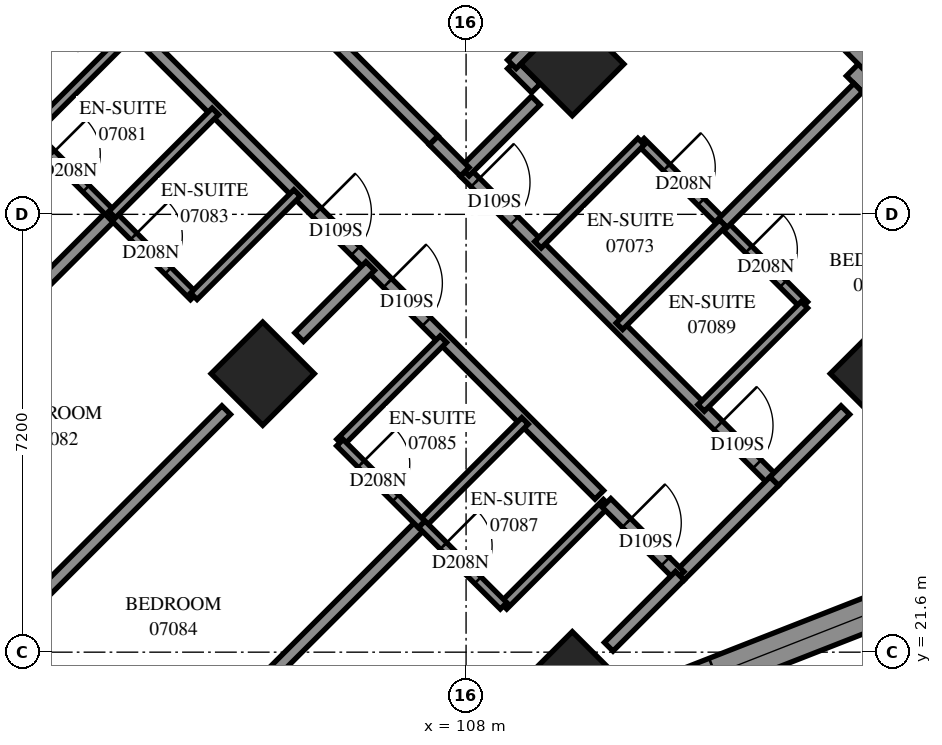
"""IFC4 building model, lengths in metres.
Left out: names, types, materials, properties, quantities, classifications, styles, units other than length and angle.
Written with IfcOpenShell. Run it as: python <this file> out.ifc"""

import sys

from ifc_helpers import new_model, si_unit, direction, frame, frame_2d, origin, origin_2d, place, context, subcontext, project, spatial, polyline, rectangle, outline, extrude, element, fill, save


model = new_model("IFC4")
c1 = context("Model", 3, precision=1e-05, world=origin(), true_north=direction((0.0, 1.0)))
c2 = subcontext(c1, "Body", "Model", "MODEL_VIEW")
j1 = project(units=[si_unit("LENGTHUNIT", "METRE"), si_unit("PLANEANGLEUNIT", "RADIAN")], contexts=[c1])
p1 = place(None, origin())
s1 = spatial("IfcSite", under=j1, at=p1, CompositionType="ELEMENT")
p2 = place(p1, origin())
s2 = spatial("IfcBuilding", under=s1, at=p2, CompositionType="ELEMENT")
p3 = place(p2, frame((0.0, 0.0, 30.4)))
s3 = spatial("IfcBuildingStorey", under=s2, at=p3, CompositionType="ELEMENT", Elevation=30.4)
for number, where, z_axis, x_axis in (
    (1, (109.747, 31.271, 0.0), (0.0, 0.0, 1.0), (0.707, -0.707, 0.0)),
    (2, (104.656, 26.18, 0.0), (0.0, 0.0, 1.0), (0.707, -0.707, 0.0)),
    (3, (114.838, 26.18, 0.0), (0.0, 0.0, 1.0), (0.707, -0.707, 0.0)),
    (4, (109.747, 21.088, 0.0), (0.0, 0.0, 1.0), (0.707, -0.707, 0.0)),
):
    element("IfcColumn", number, at=place(p3, frame(where, z_axis=z_axis, x_axis=x_axis)), inside=s3, PredefinedType="COLUMN", context=c2, shape_type="SweptSolid", body=[
        extrude(rectangle(XDim=1.2, YDim=1.2, at=origin_2d()), origin(), (0.0, 0.0, 1.0), 3.1),
    ])
p4 = place(p3, frame((111.044, 20.83, 0.0), z_axis=(0.0, 0.0, 1.0), x_axis=(0.9311384103, 0.3646659578, 0.0)))
e5 = element("IfcWall", 5, at=p4, inside=s3, PredefinedType="SOLIDWALL", context=c2, shape_type="SweptSolid", body=[
    extrude(outline(polyline([(0.12, -0.275), (5.613, -0.275), (5.361, 0.275), (-0.12, 0.275), (0.12, -0.275)])), origin(), (0.0, 0.0, 1.0), 3.1),
])
p5 = place(p4, frame((1.13, 0.0, 0.5)))
e6 = element("IfcOpeningElement", 6, at=p5, cuts=e5, PredefinedType="OPENING", context=c2, shape_type="SweptSolid", body=[
    extrude(rectangle(XDim=2.8, YDim=2.45, at=frame_2d((1.4, 1.225))), frame((0.0, 0.285, 0.0), z_axis=(0.0, -1.0, 0.0), x_axis=(1.0, 0.0, 0.0)), (0.0, 0.0, 1.0), 0.57),
])
p6 = place(p3, frame((117.915, 27.805, 0.0), z_axis=(0.0, 0.0, 1.0), x_axis=(-0.7070965801, 0.7071169822, 0.0)))
e7 = element("IfcWall", 7, at=p6, inside=s3, PredefinedType="SOLIDWALL", context=c2, shape_type="SweptSolid", body=[
    extrude(outline(polyline([(-0.173, -0.275), (4.627, -0.275), (5.176, 0.275), (0.173, 0.275), (-0.173, -0.275)])), origin(), (0.0, 0.0, 1.0), 3.1),
])
p7 = place(p6, frame((1.964, 0.0, 0.6)))
e8 = element("IfcOpeningElement", 8, at=p7, cuts=e7, PredefinedType="OPENING", context=c2, shape_type="SweptSolid", body=[
    extrude(rectangle(XDim=1.8, YDim=1.9, at=frame_2d((0.9, 0.95))), frame((0.0, 0.285, 0.0), z_axis=(0.0, -1.0, 0.0), x_axis=(1.0, 0.0, 0.0)), (0.0, 0.0, 1.0), 0.57),
])
p8 = place(p3, frame((114.449, 31.271, 0.0), z_axis=(0.0, 0.0, 1.0), x_axis=(0.7070979247, 0.7071156376, 0.0)))
e9 = element("IfcWall", 9, at=p8, inside=s3, PredefinedType="SOLIDWALL", context=c2, shape_type="SweptSolid", body=[
    extrude(outline(polyline([(0.275, -0.275), (6.005, -0.275), (5.286, 0.275), (-0.275, 0.275), (0.275, -0.275)])), origin(), (0.0, 0.0, 1.0), 3.1),
])
p9 = place(p8, frame((1.137, 0.0, 0.6)))
e10 = element("IfcOpeningElement", 10, at=p9, cuts=e9, PredefinedType="OPENING", context=c2, shape_type="SweptSolid", body=[
    extrude(rectangle(XDim=1.8, YDim=1.9, at=frame_2d((0.9, 0.95))), frame((0.0, 0.285, 0.0), z_axis=(0.0, -1.0, 0.0), x_axis=(1.0, 0.0, 0.0)), (0.0, 0.0, 1.0), 0.57),
])
p10 = place(p3, frame((102.609, 31.769, 0.0), z_axis=(0.0, 0.0, 1.0), x_axis=(0.7071067812, -0.7071067812, 0.0)))
e11 = element("IfcWall", 11, at=p10, inside=s3, PredefinedType="PARTITIONING", context=c2, shape_type="SweptSolid", body=[
    extrude(rectangle(XDim=10.723, YDim=0.2, at=frame_2d((5.361, 0.0))), origin(), (0.0, 0.0, 1.0), 3.1),
])
p11 = place(p10, frame((4.15, 0.0, 0.0)))
e12 = element("IfcOpeningElement", 12, at=p11, cuts=e11, PredefinedType="OPENING", context=c2, shape_type="SweptSolid", body=[
    extrude(rectangle(XDim=0.9, YDim=2.1, at=frame_2d((0.45, 1.05))), frame((0.0, 0.11, 0.0), z_axis=(0.0, -1.0, 0.0), x_axis=(1.0, 0.0, 0.0)), (0.0, 0.0, 1.0), 0.22),
])
p12 = place(p10, frame((5.8, 0.0, 0.0)))
e13 = element("IfcOpeningElement", 13, at=p12, cuts=e11, PredefinedType="OPENING", context=c2, shape_type="SweptSolid", body=[
    extrude(rectangle(XDim=0.9, YDim=2.1, at=frame_2d((0.45, 1.05))), frame((0.0, 0.11, 0.0), z_axis=(0.0, -1.0, 0.0), x_axis=(1.0, 0.0, 0.0)), (0.0, 0.0, 1.0), 0.22),
])
p13 = place(p3, frame((101.592, 18.033, 0.0), z_axis=(0.0, 0.0, 1.0), x_axis=(0.7072375867, 0.7069759514, 0.0)))
e14 = element("IfcWall", 14, at=p13, inside=s3, PredefinedType="PARTITIONING", context=c2, shape_type="SweptSolid", body=[
    extrude(rectangle(XDim=8.026, YDim=0.2, at=frame_2d((4.013, 0.0))), origin(), (0.0, 0.0, 1.0), 3.1),
])
p14 = place(p3, frame((96.538, 23.155, 0.0), z_axis=(0.0, 0.0, 1.0), x_axis=(0.7071130469, 0.7071005154, 0.0)))
e15 = element("IfcWall", 15, at=p14, inside=s3, PredefinedType="PARTITIONING", context=c2, shape_type="SweptSolid", body=[
    extrude(rectangle(XDim=7.98, YDim=0.2, at=frame_2d((3.99, 0.0))), origin(), (0.0, 0.0, 1.0), 3.1),
])
p15 = place(p3, frame((107.977, 29.499, 0.0), z_axis=(0.0, 0.0, 1.0), x_axis=(0.7071067812, -0.7071067812, 0.0)))
e16 = element("IfcWall", 16, at=p15, inside=s3, PredefinedType="PARTITIONING", context=c2, shape_type="SweptSolid", body=[
    extrude(rectangle(XDim=7.198, YDim=0.2, at=frame_2d((3.599, 0.0))), origin(), (0.0, 0.0, 1.0), 3.1),
])
p16 = place(p15, frame((0.247, 0.0, 0.0)))
e17 = element("IfcOpeningElement", 17, at=p16, cuts=e16, PredefinedType="OPENING", context=c2, shape_type="SweptSolid", body=[
    extrude(rectangle(XDim=0.9, YDim=2.1, at=frame_2d((0.45, 1.05))), frame((0.0, 0.11, 0.0), z_axis=(0.0, -1.0, 0.0), x_axis=(1.0, 0.0, 0.0)), (0.0, 0.0, 1.0), 0.22),
])
p17 = place(p15, frame((5.899, 0.0, 0.0)))
e18 = element("IfcOpeningElement", 18, at=p17, cuts=e16, PredefinedType="OPENING", context=c2, shape_type="SweptSolid", body=[
    extrude(rectangle(XDim=0.9, YDim=2.1, at=frame_2d((0.45, 1.05))), frame((0.0, 0.11, 0.0), z_axis=(0.0, -1.0, 0.0), x_axis=(1.0, 0.0, 0.0)), (0.0, 0.0, 1.0), 0.22),
])
p18 = place(p3, frame((100.163, 21.689, 0.0), z_axis=(0.0, 0.0, 1.0), x_axis=(0.7071067812, 0.7071067812, 0.0)))
e19 = element("IfcWall", 19, at=p18, inside=s3, PredefinedType="PARTITIONING", context=c2, shape_type="SweptSolid", body=[
    extrude(rectangle(XDim=5.504, YDim=0.2, at=frame_2d((2.752, 0.0))), origin(), (0.0, 0.0, 1.0), 3.1),
])
p19 = place(p3, frame((110.875, 29.995, 0.0), z_axis=(0.0, 0.0, 1.0), x_axis=(0.7071067812, -0.7071067812, 0.0)))
e20 = element("IfcWall", 20, at=p19, inside=s3, PredefinedType="PARTITIONING", context=c2, shape_type="SweptSolid", body=[
    extrude(rectangle(XDim=3.801, YDim=0.15, at=frame_2d((1.901, 0.0))), origin(), (0.0, 0.0, 1.0), 3.1),
])
p20 = place(p19, frame((0.598, 0.0, 0.0)))
e21 = element("IfcOpeningElement", 21, at=p20, cuts=e20, PredefinedType="OPENING", context=c2, shape_type="SweptSolid", body=[
    extrude(rectangle(XDim=0.8, YDim=2.1, at=frame_2d((0.4, 1.05))), frame((0.0, 0.085, 0.0), z_axis=(0.0, -1.0, 0.0), x_axis=(1.0, 0.0, 0.0)), (0.0, 0.0, 1.0), 0.17),
])
p21 = place(p19, frame((2.507, 0.0, 0.0)))
e22 = element("IfcOpeningElement", 22, at=p21, cuts=e20, PredefinedType="OPENING", context=c2, shape_type="SweptSolid", body=[
    extrude(rectangle(XDim=0.8, YDim=2.1, at=frame_2d((0.4, 1.05))), frame((0.0, 0.085, 0.0), z_axis=(0.0, -1.0, 0.0), x_axis=(1.0, 0.0, 0.0)), (0.0, 0.0, 1.0), 0.17),
])
p22 = place(p3, frame((100.836, 30.138, 0.0), z_axis=(0.0, 0.0, 1.0), x_axis=(0.7065802685, -0.7076329021, 0.0)))
e23 = element("IfcWall", 23, at=p22, inside=s3, PredefinedType="PARTITIONING", context=c2, shape_type="SweptSolid", body=[
    extrude(rectangle(XDim=3.8, YDim=0.15, at=frame_2d((1.9, 0.0))), origin(), (0.0, 0.0, 1.0), 3.1),
])
p23 = place(p22, frame((0.493, 0.0, 0.0)))
e24 = element("IfcOpeningElement", 24, at=p23, cuts=e23, PredefinedType="OPENING", context=c2, shape_type="SweptSolid", body=[
    extrude(rectangle(XDim=0.8, YDim=2.1, at=frame_2d((0.4, 1.05))), frame((0.0, 0.085, 0.0), z_axis=(0.0, -1.0, 0.0), x_axis=(1.0, 0.0, 0.0)), (0.0, 0.0, 1.0), 0.17),
])
p24 = place(p22, frame((2.402, 0.0, 0.0)))
e25 = element("IfcOpeningElement", 25, at=p24, cuts=e23, PredefinedType="OPENING", context=c2, shape_type="SweptSolid", body=[
    extrude(rectangle(XDim=0.8, YDim=2.1, at=frame_2d((0.4, 1.05))), frame((0.0, 0.085, 0.0), z_axis=(0.0, -1.0, 0.0), x_axis=(1.0, 0.0, 0.0)), (0.0, 0.0, 1.0), 0.17),
])
p25 = place(p3, frame((112.221, 28.655, 0.0), z_axis=(0.0, 0.0, 1.0), x_axis=(0.7071067812, 0.7071067812, 0.0)))
e26 = element("IfcWall", 26, at=p25, inside=s3, PredefinedType="PARTITIONING", context=c2, shape_type="SweptSolid", body=[
    extrude(rectangle(XDim=3.15, YDim=0.2, at=frame_2d((1.575, 0.0))), origin(), (0.0, 0.0, 1.0), 3.1),
])
p26 = place(p3, frame((105.435, 32.049, 0.0), z_axis=(0.0, 0.0, 1.0), x_axis=(0.7074545101, -0.7067588812, 0.0)))
e27 = element("IfcWall", 27, at=p26, inside=s3, PredefinedType="PARTITIONING", context=c2, shape_type="SweptSolid", body=[
    extrude(rectangle(XDim=2.875, YDim=0.2, at=frame_2d((1.438, 0.0))), origin(), (0.0, 0.0, 1.0), 3.1),
])
for number, where, z_axis, x_axis in (
    (28, (103.523, 27.453, 0.0), (0.0, 0.0, 1.0), (0.707, 0.707, 0.0)),
    (29, (105.927, 25.049, 0.0), (0.0, 0.0, 1.0), (0.707, 0.707, 0.0)),
    (30, (107.271, 23.705, 0.0), (0.0, 0.0, 1.0), (0.707, 0.707, 0.0)),
):
    element("IfcWall", number, at=place(p3, frame(where, z_axis=z_axis, x_axis=x_axis)), inside=s3, PredefinedType="PARTITIONING", context=c2, shape_type="SweptSolid", body=[
        extrude(rectangle(XDim=2.401, YDim=0.15, at=frame_2d((1.201, 0.0))), origin(), (0.0, 0.0, 1.0), 3.1),
    ])
for number, where, z_axis, x_axis in (
    (31, (109.182, 28.3, 0.0), (0.0, 0.0, 1.0), (0.707, 0.708, 0.0)),
    (32, (111.865, 25.616, 0.0), (0.0, 0.0, 1.0), (0.708, 0.707, 0.0)),
    (33, (110.522, 26.96, 0.0), (0.0, 0.0, 1.0), (0.708, 0.707, 0.0)),
):
    element("IfcWall", number, at=place(p3, frame(where, z_axis=z_axis, x_axis=x_axis)), inside=s3, PredefinedType="PARTITIONING", context=c2, shape_type="SweptSolid", body=[
        extrude(rectangle(XDim=2.4, YDim=0.15, at=frame_2d((1.2, 0.0))), origin(), (0.0, 0.0, 1.0), 3.1),
    ])
for number, where, z_axis, x_axis in (
    (34, (100.837, 30.141, 0.0), (0.0, 0.0, 1.0), (0.707, 0.707, 0.0)),
    (35, (108.615, 22.363, 0.0), (0.0, 0.0, 1.0), (0.707, 0.707, 0.0)),
    (36, (102.181, 28.797, 0.0), (0.0, 0.0, 1.0), (0.707, 0.707, 0.0)),
):
    element("IfcWall", number, at=place(p3, frame(where, z_axis=z_axis, x_axis=x_axis)), inside=s3, PredefinedType="PARTITIONING", context=c2, shape_type="SweptSolid", body=[
        extrude(rectangle(XDim=2.398, YDim=0.15, at=frame_2d((1.199, 0.0))), origin(), (0.0, 0.0, 1.0), 3.1),
    ])
p27 = place(p3, frame((111.513, 22.857, 0.0), z_axis=(0.0, 0.0, 1.0), x_axis=(0.7071067812, 0.7071067812, 0.0)))
e37 = element("IfcWall", 37, at=p27, inside=s3, PredefinedType="PARTITIONING", context=c2, shape_type="SweptSolid", body=[
    extrude(rectangle(XDim=2.2, YDim=0.2, at=frame_2d((1.1, 0.0))), origin(), (0.0, 0.0, 1.0), 2.6),
])
p28 = place(p3, frame((105.925, 25.045, 0.0), z_axis=(0.0, 0.0, 1.0), x_axis=(0.7071067812, -0.7071067812, 0.0)))
e38 = element("IfcWall", 38, at=p28, inside=s3, PredefinedType="PARTITIONING", context=c2, shape_type="SweptSolid", body=[
    extrude(rectangle(XDim=1.901, YDim=0.15, at=frame_2d((0.95, 0.0))), origin(), (0.0, 0.0, 1.0), 3.1),
])
p29 = place(p28, frame((0.493, 0.0, 0.0)))
e39 = element("IfcOpeningElement", 39, at=p29, cuts=e38, PredefinedType="OPENING", context=c2, shape_type="SweptSolid", body=[
    extrude(rectangle(XDim=0.8, YDim=2.1, at=frame_2d((0.4, 1.05))), frame((0.0, 0.085, 0.0), z_axis=(0.0, -1.0, 0.0), x_axis=(1.0, 0.0, 0.0)), (0.0, 0.0, 1.0), 0.17),
])
p30 = place(p3, frame((107.272, 23.704, 0.0), z_axis=(0.0, 0.0, 1.0), x_axis=(0.7076330979, -0.7065800724, 0.0)))
e40 = element("IfcWall", 40, at=p30, inside=s3, PredefinedType="PARTITIONING", context=c2, shape_type="SweptSolid", body=[
    extrude(rectangle(XDim=1.899, YDim=0.15, at=frame_2d((0.95, 0.0))), origin(), (0.0, 0.0, 1.0), 3.1),
])
p31 = place(p30, frame((0.503, 0.0, 0.0)))
e41 = element("IfcOpeningElement", 41, at=p31, cuts=e40, PredefinedType="OPENING", context=c2, shape_type="SweptSolid", body=[
    extrude(rectangle(XDim=0.8, YDim=2.1, at=frame_2d((0.4, 1.05))), frame((0.0, 0.085, 0.0), z_axis=(0.0, -1.0, 0.0), x_axis=(1.0, 0.0, 0.0)), (0.0, 0.0, 1.0), 0.17),
])
p32 = place(p3, frame((110.309, 24.055, 0.0), z_axis=(0.0, 0.0, 1.0), x_axis=(0.7071067812, -0.7071067812, 0.0)))
e42 = element("IfcWall", 42, at=p32, inside=s3, PredefinedType="PARTITIONING", context=c2, shape_type="SweptSolid", body=[
    extrude(rectangle(XDim=1.7, YDim=0.2, at=frame_2d((0.85, 0.0))), origin(), (0.0, 0.0, 1.0), 3.1),
])
p33 = place(p32, frame((0.467, 0.0, 0.0)))
e43 = element("IfcOpeningElement", 43, at=p33, cuts=e42, PredefinedType="OPENING", context=c2, shape_type="SweptSolid", body=[
    extrude(rectangle(XDim=0.9, YDim=2.1, at=frame_2d((0.45, 1.05))), frame((0.0, 0.11, 0.0), z_axis=(0.0, -1.0, 0.0), x_axis=(1.0, 0.0, 0.0)), (0.0, 0.0, 1.0), 0.22),
])
p34 = place(p3, frame((105.255, 26.781, 0.0), z_axis=(0.0, 0.0, 1.0), x_axis=(0.7071067812, 0.7071067812, 0.0)))
e44 = element("IfcWall", 44, at=p34, inside=s3, PredefinedType="PARTITIONING", context=c2, shape_type="SweptSolid", body=[
    extrude(rectangle(XDim=1.652, YDim=0.2, at=frame_2d((0.826, 0.0))), origin(), (0.0, 0.0, 1.0), 3.1),
])
for number, where, z_axis, x_axis in (
    (45, (110.346, 21.689, 0.0), (0.0, 0.0, 1.0), (0.707, 0.707, 0.0)),
    (46, (113.07, 24.413, 0.0), (0.0, 0.0, 1.0), (0.707, 0.707, 0.0)),
):
    element("IfcWall", number, at=place(p3, frame(where, z_axis=z_axis, x_axis=x_axis)), inside=s3, PredefinedType="PARTITIONING", context=c2, shape_type="SweptSolid", body=[
        extrude(rectangle(XDim=1.652, YDim=0.2, at=frame_2d((0.826, 0.0))), origin(), (0.0, 0.0, 1.0), 2.6),
    ])
p35 = place(p3, frame((107.978, 29.504, 0.0), z_axis=(0.0, 0.0, 1.0), x_axis=(0.7071067812, 0.7071067812, 0.0)))
e47 = element("IfcWall", 47, at=p35, inside=s3, PredefinedType="PARTITIONING", context=c2, shape_type="SweptSolid", body=[
    extrude(rectangle(XDim=1.652, YDim=0.2, at=frame_2d((0.826, 0.0))), origin(), (0.0, 0.0, 1.0), 3.1),
])
p36 = place(p3, frame((107.466, 30.014, 0.0), z_axis=(0.0, 0.0, 1.0), x_axis=(0.7057270646, -0.7084838109, 0.0)))
e48 = element("IfcWall", 48, at=p36, inside=s3, PredefinedType="PARTITIONING", context=c2, shape_type="SweptSolid", body=[
    extrude(rectangle(XDim=0.726, YDim=0.2, at=frame_2d((0.363, 0.0))), origin(), (0.0, 0.0, 1.0), 3.1),
])
for number, where, z_axis, x_axis in (
    (49, (108.754, 31.268, 0.0), (0.0, 0.0, 1.0), (0.707, -0.707, 0.0)),
    (50, (108.753, 31.269, 0.0), (0.0, 0.0, 1.0), (0.707, 0.707, 0.0)),
):
    element("IfcWall", number, at=place(p3, frame(where, z_axis=z_axis, x_axis=x_axis)), inside=s3, PredefinedType="PARTITIONING", context=c2, shape_type="SweptSolid", body=[
        extrude(rectangle(XDim=0.557, YDim=0.2, at=frame_2d((0.279, 0.0))), origin(), (0.0, 0.0, 1.0), 3.1),
    ])
p37 = place(p5, origin())
e51 = element("IfcWindow", 51, at=p37, inside=s3, PartitioningType="SINGLE_PANEL", PredefinedType="WINDOW", context=c2, shape_type="SweptSolid", body=[
    extrude(rectangle(XDim=2.8, YDim=2.45, at=frame_2d((1.4, 1.225))), frame((0.0, 0.155, 0.0), z_axis=(0.0, -1.0, 0.0), x_axis=(1.0, 0.0, 0.0)), (0.0, 0.0, 1.0), 0.06),
])
fill(e6, e51)
p38 = place(p16, origin())
e52 = element("IfcDoor", 52, at=p38, inside=s3, OperationType="SINGLE_SWING_LEFT", PredefinedType="DOOR", context=c2, shape_type="SweptSolid", body=[
    extrude(rectangle(XDim=0.9, YDim=2.1, at=frame_2d((0.45, 1.05))), frame((0.0, 0.025, 0.0), z_axis=(0.0, -1.0, 0.0), x_axis=(1.0, 0.0, 0.0)), (0.0, 0.0, 1.0), 0.05),
])
fill(e17, e52)
p39 = place(p20, origin())
e53 = element("IfcDoor", 53, at=p39, inside=s3, OperationType="SINGLE_SWING_RIGHT", PredefinedType="DOOR", context=c2, shape_type="SweptSolid", body=[
    extrude(rectangle(XDim=0.8, YDim=2.1, at=frame_2d((0.4, 1.05))), frame((0.0, 0.025, 0.0), z_axis=(0.0, -1.0, 0.0), x_axis=(1.0, 0.0, 0.0)), (0.0, 0.0, 1.0), 0.05),
])
fill(e21, e53)
p40 = place(p23, origin())
e54 = element("IfcDoor", 54, at=p40, inside=s3, OperationType="SINGLE_SWING_RIGHT", PredefinedType="DOOR", context=c2, shape_type="SweptSolid", body=[
    extrude(rectangle(XDim=0.8, YDim=2.1, at=frame_2d((0.4, 1.05))), frame((0.0, 0.025, 0.0), z_axis=(0.0, -1.0, 0.0), x_axis=(1.0, 0.0, 0.0)), (0.0, 0.0, 1.0), 0.05),
])
fill(e24, e54)
p41 = place(p11, origin())
e55 = element("IfcDoor", 55, at=p41, inside=s3, OperationType="SINGLE_SWING_LEFT", PredefinedType="DOOR", context=c2, shape_type="SweptSolid", body=[
    extrude(rectangle(XDim=0.9, YDim=2.1, at=frame_2d((0.45, 1.05))), frame((0.0, 0.025, 0.0), z_axis=(0.0, -1.0, 0.0), x_axis=(1.0, 0.0, 0.0)), (0.0, 0.0, 1.0), 0.05),
])
fill(e12, e55)
p42 = place(p24, origin())
e56 = element("IfcDoor", 56, at=p42, inside=s3, OperationType="SINGLE_SWING_RIGHT", PredefinedType="DOOR", context=c2, shape_type="SweptSolid", body=[
    extrude(rectangle(XDim=0.8, YDim=2.1, at=frame_2d((0.4, 1.05))), frame((0.0, 0.025, 0.0), z_axis=(0.0, -1.0, 0.0), x_axis=(1.0, 0.0, 0.0)), (0.0, 0.0, 1.0), 0.05),
])
fill(e25, e56)
p43 = place(p12, origin())
e57 = element("IfcDoor", 57, at=p43, inside=s3, OperationType="SINGLE_SWING_RIGHT", PredefinedType="DOOR", context=c2, shape_type="SweptSolid", body=[
    extrude(rectangle(XDim=0.9, YDim=2.1, at=frame_2d((0.45, 1.05))), frame((0.0, 0.025, 0.0), z_axis=(0.0, -1.0, 0.0), x_axis=(1.0, 0.0, 0.0)), (0.0, 0.0, 1.0), 0.05),
])
fill(e13, e57)
p44 = place(p29, origin())
e58 = element("IfcDoor", 58, at=p44, inside=s3, OperationType="SINGLE_SWING_RIGHT", PredefinedType="DOOR", context=c2, shape_type="SweptSolid", body=[
    extrude(rectangle(XDim=0.8, YDim=2.1, at=frame_2d((0.4, 1.05))), frame((0.0, 0.025, 0.0), z_axis=(0.0, -1.0, 0.0), x_axis=(1.0, 0.0, 0.0)), (0.0, 0.0, 1.0), 0.05),
])
fill(e39, e58)
p45 = place(p33, origin())
e59 = element("IfcDoor", 59, at=p45, inside=s3, OperationType="SINGLE_SWING_LEFT", PredefinedType="DOOR", context=c2, shape_type="SweptSolid", body=[
    extrude(rectangle(XDim=0.9, YDim=2.1, at=frame_2d((0.45, 1.05))), frame((0.0, 0.025, 0.0), z_axis=(0.0, -1.0, 0.0), x_axis=(1.0, 0.0, 0.0)), (0.0, 0.0, 1.0), 0.05),
])
fill(e43, e59)
p46 = place(p31, origin())
e60 = element("IfcDoor", 60, at=p46, inside=s3, OperationType="SINGLE_SWING_RIGHT", PredefinedType="DOOR", context=c2, shape_type="SweptSolid", body=[
    extrude(rectangle(XDim=0.8, YDim=2.1, at=frame_2d((0.4, 1.05))), frame((0.0, 0.025, 0.0), z_axis=(0.0, -1.0, 0.0), x_axis=(1.0, 0.0, 0.0)), (0.0, 0.0, 1.0), 0.05),
])
fill(e41, e60)
p47 = place(p17, origin())
e61 = element("IfcDoor", 61, at=p47, inside=s3, OperationType="SINGLE_SWING_RIGHT", PredefinedType="DOOR", context=c2, shape_type="SweptSolid", body=[
    extrude(rectangle(XDim=0.9, YDim=2.1, at=frame_2d((0.45, 1.05))), frame((0.0, 0.025, 0.0), z_axis=(0.0, -1.0, 0.0), x_axis=(1.0, 0.0, 0.0)), (0.0, 0.0, 1.0), 0.05),
])
fill(e18, e61)
p48 = place(p21, origin())
e62 = element("IfcDoor", 62, at=p48, inside=s3, OperationType="SINGLE_SWING_RIGHT", PredefinedType="DOOR", context=c2, shape_type="SweptSolid", body=[
    extrude(rectangle(XDim=0.8, YDim=2.1, at=frame_2d((0.4, 1.05))), frame((0.0, 0.025, 0.0), z_axis=(0.0, -1.0, 0.0), x_axis=(1.0, 0.0, 0.0)), (0.0, 0.0, 1.0), 0.05),
])
fill(e22, e62)
save(model, sys.argv[1])
